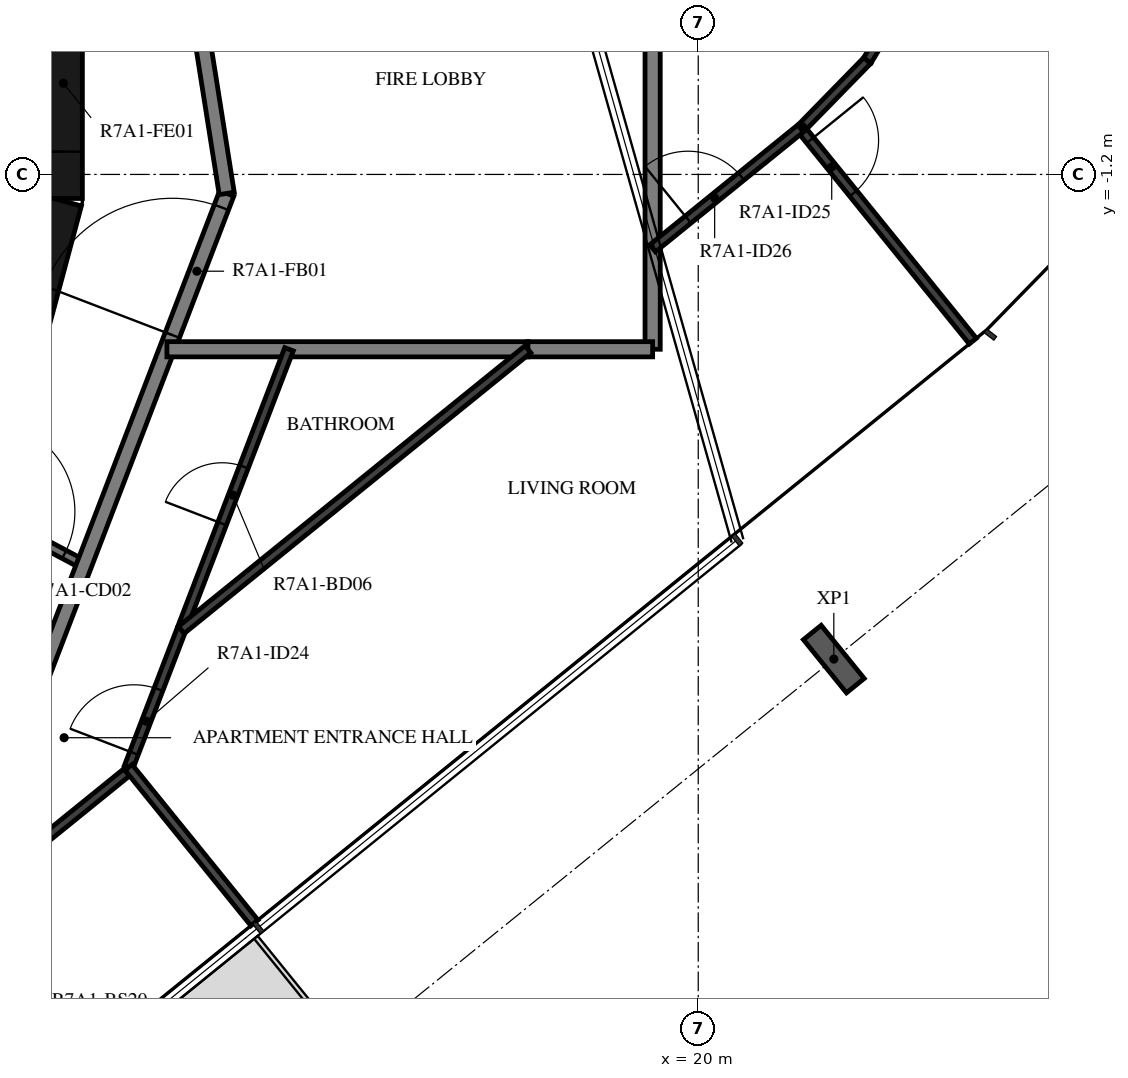
"""IFC4 building model, lengths in metres.
Left out: names, types, materials, properties, quantities, classifications, styles, units other than length and angle.
Written with IfcOpenShell. Run it as: python <this file> out.ifc"""

import sys

from ifc_helpers import new_model, si_unit, direction, frame, frame_2d, origin, origin_2d, place, context, subcontext, project, spatial, rectangle, i_section, extrude, element, fill, save


model = new_model("IFC4")
c1 = context("Model", 3, precision=1e-05, world=origin(), true_north=direction((0.0, 1.0)))
c2 = subcontext(c1, "Body", "Model", "MODEL_VIEW")
j1 = project(units=[si_unit("LENGTHUNIT", "METRE"), si_unit("PLANEANGLEUNIT", "RADIAN")], contexts=[c1])
p1 = place(None, origin())
s1 = spatial("IfcSite", under=j1, at=p1, CompositionType="ELEMENT")
p2 = place(p1, origin())
s2 = spatial("IfcBuilding", under=s1, at=p2, CompositionType="ELEMENT")
p3 = place(p2, frame((0.0, 0.0, 266.9)))
s3 = spatial("IfcBuildingStorey", under=s2, at=p3, CompositionType="ELEMENT", Elevation=266.9)
p4 = place(p3, frame((21.784, -7.576, -0.38), z_axis=(0.0, 0.0, 1.0), x_axis=(-0.777146167973, -0.629320136024, 0.0)))
e1 = element("IfcColumn", 1, at=p4, inside=s3, PredefinedType="COLUMN", context=c2, shape_type="SweptSolid", body=[
    extrude(i_section(OverallWidth=0.3, OverallDepth=0.9, WebThickness=0.019, FlangeThickness=0.035, FilletRadius=0.03, at=origin_2d()), origin(), (0.0, 0.0, 1.0), 3.5),
])
p5 = place(p3, frame((10.858, -4.479, 0.0), z_axis=(0.0, 0.0, 1.0), x_axis=(0.258734743916, 0.965948410781, 0.0)))
e2 = element("IfcWall", 2, at=p5, inside=s3, PredefinedType="SHEAR", context=c2, shape_type="SweptSolid", body=[
    extrude(rectangle(XDim=3.033, YDim=0.5, at=frame_2d((1.516, 0.0))), origin(), (0.0, 0.0, 1.0), 3.12),
])
p6 = place(p3, frame((11.647, -1.516, 0.0), z_axis=(0.0, 0.0, 1.0), x_axis=(0.0, 1.0, 0.0)))
e3 = element("IfcWall", 3, at=p6, inside=s3, PredefinedType="SHEAR", context=c2, shape_type="SweptSolid", body=[
    extrude(rectangle(XDim=3.033, YDim=0.5, at=frame_2d((1.516, 0.0))), origin(), (0.0, 0.0, 1.0), 3.12),
])
p7 = place(p6, frame((0.616, 0.0, 0.0)))
e4 = element("IfcOpeningElement", 4, at=p7, cuts=e3, PredefinedType="OPENING", context=c2, shape_type="SweptSolid", body=[
    extrude(rectangle(XDim=1.8, YDim=2.1, at=frame_2d((0.9, 1.05))), frame((0.0, 0.26, 0.0), z_axis=(0.0, -1.0, 0.0), x_axis=(1.0, 0.0, 0.0)), (0.0, 0.0, 1.0), 0.52),
])
p8 = place(p3, frame((10.511, -5.589, 0.0), z_axis=(0.0, 0.0, 1.0), x_axis=(0.882983002821, -0.469404960273, 0.0)))
e5 = element("IfcWall", 5, at=p8, inside=s3, PredefinedType="PARTITIONING", context=c2, shape_type="SweptSolid", body=[
    extrude(rectangle(XDim=1.596, YDim=0.12, at=frame_2d((0.798, 0.0))), origin(), (0.0, 0.0, 1.0), 3.12),
])
p9 = place(p8, frame((0.1, 0.0, 0.0)))
e6 = element("IfcOpeningElement", 6, at=p9, cuts=e5, PredefinedType="OPENING", context=c2, shape_type="SweptSolid", body=[
    extrude(rectangle(XDim=1.2, YDim=2.1, at=frame_2d((0.6, 1.05))), frame((0.0, 0.07, 0.0), z_axis=(0.0, -1.0, 0.0), x_axis=(1.0, 0.0, 0.0)), (0.0, 0.0, 1.0), 0.14),
])
p10 = place(p3, frame((11.223, -8.154, 0.0), z_axis=(0.0, 0.0, 1.0), x_axis=(0.358341090983, 0.93359073609, 0.0)))
e7 = element("IfcWall", 7, at=p10, inside=s3, PredefinedType="STANDARD", context=c2, shape_type="SweptSolid", body=[
    extrude(rectangle(XDim=7.181, YDim=0.2, at=frame_2d((3.59, 0.0))), origin(), (0.0, 0.0, 1.0), 3.12),
])
p11 = place(p10, frame((5.185, 0.0, 0.0)))
e8 = element("IfcOpeningElement", 8, at=p11, cuts=e7, PredefinedType="OPENING", context=c2, shape_type="SweptSolid", body=[
    extrude(rectangle(XDim=1.8, YDim=2.1, at=frame_2d((0.9, 1.05))), frame((0.0, 0.11, 0.0), z_axis=(0.0, -1.0, 0.0), x_axis=(1.0, 0.0, 0.0)), (0.0, 0.0, 1.0), 0.22),
])
p12 = place(p3, frame((13.797, -1.45, 0.0), z_axis=(0.0, 0.0, 1.0), x_axis=(-0.156421704315, 0.987690361611, 0.0)))
e9 = element("IfcWall", 9, at=p12, inside=s3, PredefinedType="STANDARD", context=c2, shape_type="SweptSolid", body=[
    extrude(rectangle(XDim=7.181, YDim=0.2, at=frame_2d((3.591, 0.0))), origin(), (0.0, 0.0, 1.0), 3.12),
])
p13 = place(p3, frame((13.01, -3.5, 0.0), z_axis=(0.0, 0.0, 1.0), x_axis=(1.0, 0.0, 0.0)))
e10 = element("IfcWall", 10, at=p13, inside=s3, PredefinedType="STANDARD", context=c2, shape_type="SweptSolid", body=[
    extrude(rectangle(XDim=4.75, YDim=0.2, at=frame_2d((2.375, 0.0))), origin(), (0.0, 0.0, 1.0), 3.12),
])
p14 = place(p3, frame((19.4, -3.5, 0.0), z_axis=(0.0, 0.0, 1.0), x_axis=(0.0, 1.0, 0.0)))
e11 = element("IfcWall", 11, at=p14, inside=s3, PredefinedType="STANDARD", context=c2, shape_type="SweptSolid", body=[
    extrude(rectangle(XDim=5.021, YDim=0.2, at=frame_2d((2.511, 0.0))), origin(), (0.0, 0.0, 1.0), 3.12),
])
p15 = place(p3, frame((17.76, -3.5, 0.0), z_axis=(0.0, 0.0, 1.0), x_axis=(1.0, 0.0, 0.0)))
e12 = element("IfcWall", 12, at=p15, inside=s3, PredefinedType="STANDARD", context=c2, shape_type="SweptSolid", body=[
    extrude(rectangle(XDim=1.64, YDim=0.2, at=frame_2d((0.82, 0.0))), origin(), (0.0, 0.0, 1.0), 3.12),
])
p16 = place(p3, frame((6.274, -14.092, 0.0), z_axis=(0.0, 0.0, 1.0), x_axis=(0.777135206268, 0.62933367237, 0.0)))
e13 = element("IfcWall", 13, at=p16, inside=s3, PredefinedType="PARTITIONING", context=c2, shape_type="SweptSolid", body=[
    extrude(rectangle(XDim=7.985, YDim=0.12, at=frame_2d((3.992, 0.0))), origin(), (0.0, 0.0, 1.0), 3.12),
])
p17 = place(p16, frame((0.2, 0.0, 0.0)))
e14 = element("IfcOpeningElement", 14, at=p17, cuts=e13, PredefinedType="OPENING", context=c2, shape_type="SweptSolid", body=[
    extrude(rectangle(XDim=0.9, YDim=2.1, at=frame_2d((0.45, 1.05))), frame((0.0, 0.07, 0.0), z_axis=(0.0, -1.0, 0.0), x_axis=(1.0, 0.0, 0.0)), (0.0, 0.0, 1.0), 0.14),
])
p18 = place(p3, frame((12.505, -9.001, 0.0), z_axis=(0.0, 0.0, 1.0), x_axis=(0.358373707046, 0.933578216379, 0.0)))
e15 = element("IfcWall", 15, at=p18, inside=s3, PredefinedType="PARTITIONING", context=c2, shape_type="SweptSolid", body=[
    extrude(rectangle(XDim=5.892, YDim=0.12, at=frame_2d((2.946, 0.0))), origin(), (0.0, 0.0, 1.0), 3.12),
])
p19 = place(p18, frame((0.2, 0.0, 0.0)))
e16 = element("IfcOpeningElement", 16, at=p19, cuts=e15, PredefinedType="OPENING", context=c2, shape_type="SweptSolid", body=[
    extrude(rectangle(XDim=0.9, YDim=2.1, at=frame_2d((0.45, 1.05))), frame((0.0, 0.07, 0.0), z_axis=(0.0, -1.0, 0.0), x_axis=(1.0, 0.0, 0.0)), (0.0, 0.0, 1.0), 0.14),
])
p20 = place(p18, frame((3.436, 0.0, 0.0)))
e17 = element("IfcOpeningElement", 17, at=p20, cuts=e15, PredefinedType="OPENING", context=c2, shape_type="SweptSolid", body=[
    extrude(rectangle(XDim=0.8, YDim=2.1, at=frame_2d((0.4, 1.05))), frame((0.0, 0.07, 0.0), z_axis=(0.0, -1.0, 0.0), x_axis=(1.0, 0.0, 0.0)), (0.0, 0.0, 1.0), 0.14),
])
p21 = place(p3, frame((22.746, 1.168, 0.0), z_axis=(0.0, 0.0, 1.0), x_axis=(-0.515096534995, -0.857132171626, 0.0)))
e18 = element("IfcWall", 18, at=p21, inside=s3, PredefinedType="PARTITIONING", context=c2, shape_type="SweptSolid", body=[
    extrude(rectangle(XDim=1.016, YDim=0.12, at=frame_2d((0.508, 0.0))), origin(), (0.0, 0.0, 1.0), 3.12),
])
p22 = place(p3, frame((22.223, 0.298, 0.0), z_axis=(0.0, 0.0, 1.0), x_axis=(-0.69880109182, -0.715316037896, 0.0)))
e19 = element("IfcWall", 19, at=p22, inside=s3, PredefinedType="PARTITIONING", context=c2, shape_type="SweptSolid", body=[
    extrude(rectangle(XDim=1.227, YDim=0.12, at=frame_2d((0.614, 0.0))), origin(), (0.0, 0.0, 1.0), 3.12),
])
p23 = place(p3, frame((21.347, -0.595, 0.0), z_axis=(0.0, 0.0, 1.0), x_axis=(0.62934843781, -0.7771232488, 0.0)))
e20 = element("IfcWall", 20, at=p23, inside=s3, PredefinedType="PARTITIONING", context=c2, shape_type="SweptSolid", body=[
    extrude(rectangle(XDim=3.6, YDim=0.12, at=frame_2d((1.8, 0.0))), origin(), (0.0, 0.0, 1.0), 3.12),
])
p24 = place(p23, frame((0.2, 0.0, 0.0)))
e21 = element("IfcOpeningElement", 21, at=p24, cuts=e20, PredefinedType="OPENING", context=c2, shape_type="SweptSolid", body=[
    extrude(rectangle(XDim=0.9, YDim=2.1, at=frame_2d((0.45, 1.05))), frame((0.0, 0.07, 0.0), z_axis=(0.0, -1.0, 0.0), x_axis=(1.0, 0.0, 0.0)), (0.0, 0.0, 1.0), 0.14),
])
p25 = place(p3, frame((19.4, -2.172, 0.0), z_axis=(0.0, 0.0, 1.0), x_axis=(0.777147279935, 0.629318762862, 0.0)))
e22 = element("IfcWall", 22, at=p25, inside=s3, PredefinedType="PARTITIONING", context=c2, shape_type="SweptSolid", body=[
    extrude(rectangle(XDim=2.505, YDim=0.12, at=frame_2d((1.253, 0.0))), origin(), (0.0, 0.0, 1.0), 3.12),
])
p26 = place(p25, frame((0.6, 0.0, 0.0)))
e23 = element("IfcOpeningElement", 23, at=p26, cuts=e22, PredefinedType="OPENING", context=c2, shape_type="SweptSolid", body=[
    extrude(rectangle(XDim=0.9, YDim=2.1, at=frame_2d((0.45, 1.05))), frame((0.0, 0.07, 0.0), z_axis=(0.0, -1.0, 0.0), x_axis=(1.0, 0.0, 0.0)), (0.0, 0.0, 1.0), 0.14),
])
p27 = place(p3, frame((14.161, -11.046, 0.0), z_axis=(0.0, 0.0, 1.0), x_axis=(-0.62931028473, 0.777154145284, 0.0)))
e24 = element("IfcWall", 24, at=p27, inside=s3, PredefinedType="PARTITIONING", context=c2, shape_type="SweptSolid", body=[
    extrude(rectangle(XDim=2.632, YDim=0.12, at=frame_2d((1.316, 0.0))), origin(), (0.0, 0.0, 1.0), 2.73),
])
p28 = place(p3, frame((17.76, -3.5, 0.0), z_axis=(0.0, 0.0, 1.0), x_axis=(-0.777133455716, -0.62933583404, 0.0)))
e25 = element("IfcWall", 25, at=p28, inside=s3, PredefinedType="PARTITIONING", context=c2, shape_type="SweptSolid", body=[
    extrude(rectangle(XDim=5.869, YDim=0.12, at=frame_2d((2.935, 0.0))), origin(), (0.0, 0.0, 1.0), 3.12),
])
p29 = place(p7, origin())
e26 = element("IfcDoor", 26, at=p29, inside=s3, OperationType="DOUBLE_DOOR_SINGLE_SWING", PredefinedType="DOOR", context=c2, shape_type="SweptSolid", body=[
    extrude(rectangle(XDim=1.8, YDim=2.1, at=frame_2d((0.9, 1.05))), frame((0.0, 0.025, 0.0), z_axis=(0.0, -1.0, 0.0), x_axis=(1.0, 0.0, 0.0)), (0.0, 0.0, 1.0), 0.05),
])
fill(e4, e26)
p30 = place(p19, origin())
e27 = element("IfcDoor", 27, at=p30, inside=s3, OperationType="SINGLE_SWING_RIGHT", PredefinedType="DOOR", context=c2, shape_type="SweptSolid", body=[
    extrude(rectangle(XDim=0.9, YDim=2.1, at=frame_2d((0.45, 1.05))), frame((0.0, 0.025, 0.0), z_axis=(0.0, -1.0, 0.0), x_axis=(1.0, 0.0, 0.0)), (0.0, 0.0, 1.0), 0.05),
])
fill(e16, e27)
p31 = place(p20, origin())
e28 = element("IfcDoor", 28, at=p31, inside=s3, OperationType="SINGLE_SWING_RIGHT", PredefinedType="DOOR", context=c2, shape_type="SweptSolid", body=[
    extrude(rectangle(XDim=0.8, YDim=2.1, at=frame_2d((0.4, 1.05))), frame((0.0, 0.025, 0.0), z_axis=(0.0, -1.0, 0.0), x_axis=(1.0, 0.0, 0.0)), (0.0, 0.0, 1.0), 0.05),
])
fill(e17, e28)
p32 = place(p24, origin())
e29 = element("IfcDoor", 29, at=p32, inside=s3, OperationType="SINGLE_SWING_RIGHT", PredefinedType="DOOR", context=c2, shape_type="SweptSolid", body=[
    extrude(rectangle(XDim=0.9, YDim=2.1, at=frame_2d((0.45, 1.05))), frame((0.0, 0.025, 0.0), z_axis=(0.0, -1.0, 0.0), x_axis=(1.0, 0.0, 0.0)), (0.0, 0.0, 1.0), 0.05),
])
fill(e21, e29)
p33 = place(p26, origin())
e30 = element("IfcDoor", 30, at=p33, inside=s3, OperationType="SINGLE_SWING_LEFT", PredefinedType="DOOR", context=c2, shape_type="SweptSolid", body=[
    extrude(rectangle(XDim=0.9, YDim=2.1, at=frame_2d((0.45, 1.05))), frame((0.0, 0.025, 0.0), z_axis=(0.0, -1.0, 0.0), x_axis=(1.0, 0.0, 0.0)), (0.0, 0.0, 1.0), 0.05),
])
fill(e23, e30)
p34 = place(p9, origin())
e31 = element("IfcDoor", 31, at=p34, inside=s3, OperationType="DOUBLE_DOOR_SINGLE_SWING", PredefinedType="DOOR", context=c2, shape_type="SweptSolid", body=[
    extrude(rectangle(XDim=1.2, YDim=2.1, at=frame_2d((0.6, 1.05))), frame((0.0, 0.025, 0.0), z_axis=(0.0, -1.0, 0.0), x_axis=(1.0, 0.0, 0.0)), (0.0, 0.0, 1.0), 0.05),
])
fill(e6, e31)
p35 = place(p11, origin())
e32 = element("IfcDoor", 32, at=p35, inside=s3, OperationType="DOUBLE_DOOR_SINGLE_SWING", PredefinedType="DOOR", context=c2, shape_type="SweptSolid", body=[
    extrude(rectangle(XDim=1.8, YDim=2.1, at=frame_2d((0.9, 1.05))), frame((0.0, 0.025, 0.0), z_axis=(0.0, -1.0, 0.0), x_axis=(1.0, 0.0, 0.0)), (0.0, 0.0, 1.0), 0.05),
])
fill(e8, e32)
save(model, sys.argv[1])
